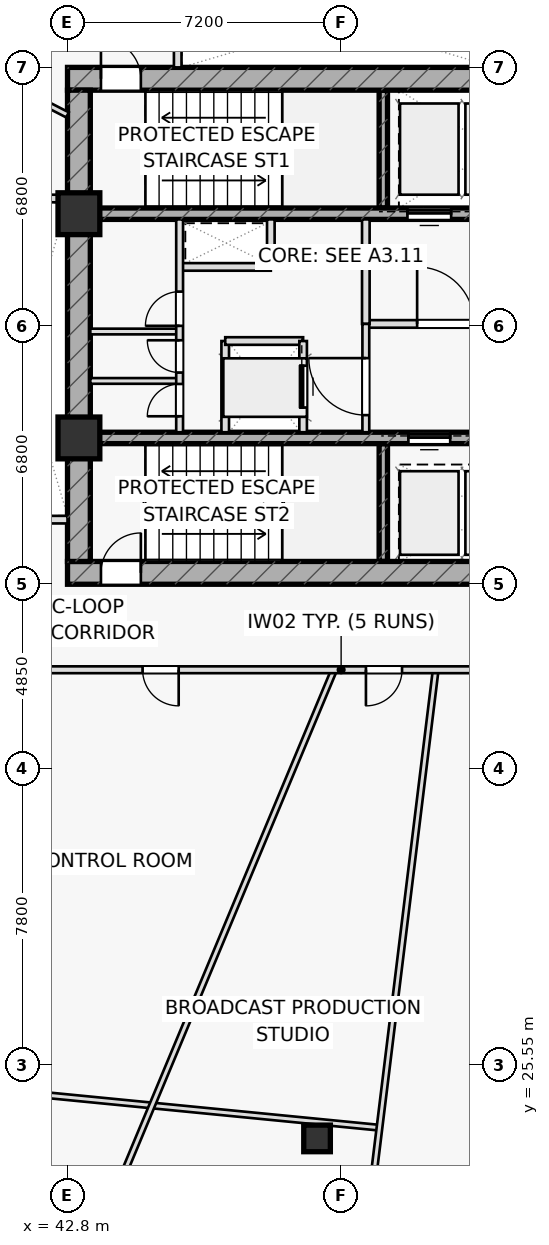
"""IFC4 building model, lengths in metres.
Left out: names, types, materials, properties, quantities, classifications, styles, units other than length and angle.
Written with IfcOpenShell. Run it as: python <this file> out.ifc"""

import sys

from ifc_helpers import new_model, si_unit, direction, frame, frame_2d, origin, origin_2d, place, context, subcontext, project, spatial, rectangle, hollow_rectangle, extrude, element, fill, save


model = new_model("IFC4")
c1 = context("Model", 3, precision=1e-05, world=origin(), true_north=direction((0.0, 1.0)))
c2 = subcontext(c1, "Body", "Model", "MODEL_VIEW")
j1 = project(units=[si_unit("LENGTHUNIT", "METRE"), si_unit("PLANEANGLEUNIT", "RADIAN")], contexts=[c1])
p1 = place(None, origin())
s1 = spatial("IfcSite", under=j1, at=p1, CompositionType="ELEMENT")
p2 = place(p1, origin())
s2 = spatial("IfcBuilding", under=s1, at=p2, CompositionType="ELEMENT")
p3 = place(p2, frame((0.0, 0.0, 115.6)))
s3 = spatial("IfcBuildingStorey", under=s2, at=p3, CompositionType="ELEMENT", Elevation=115.6)
for number, where, z_axis, x_axis in (
    (1, (51.11, 48.1, 0.0), (0.0, 0.0, 1.0), (0.0, 1.0, 0.0)),
    (2, (51.11, 38.8, 0.0), (0.0, 0.0, 1.0), (0.0, 1.0, 0.0)),
):
    element("IfcWall", number, at=place(p3, frame(where, z_axis=z_axis, x_axis=x_axis)), inside=s3, PredefinedType="SHEAR", context=c2, shape_type="SweptSolid", body=[
        extrude(rectangle(XDim=3.1, YDim=0.22, at=frame_2d((1.55, 0.0))), origin(), (0.0, 0.0, 1.0), 3.55),
    ])
p4 = place(p3, frame((42.8, 51.5, 0.0), z_axis=(0.0, 0.0, 1.0), x_axis=(1.0, 0.0, 0.0)))
e3 = element("IfcWall", 3, at=p4, inside=s3, PredefinedType="SHEAR", context=c2, shape_type="SweptSolid", body=[
    extrude(rectangle(XDim=14.4, YDim=0.6, at=frame_2d((7.2, 0.0))), origin(), (0.0, 0.0, 1.0), 3.55),
])
p5 = place(p4, frame((0.88, 0.0, 0.0)))
e4 = element("IfcOpeningElement", 4, at=p5, cuts=e3, PredefinedType="OPENING", context=c2, shape_type="SweptSolid", body=[
    extrude(rectangle(XDim=1.05, YDim=2.2, at=frame_2d((0.525, 1.1))), frame((0.0, 0.31, 0.0), z_axis=(0.0, -1.0, 0.0), x_axis=(1.0, 0.0, 0.0)), (0.0, 0.0, 1.0), 0.62),
])
p6 = place(p3, frame((42.8, 38.5, 0.0), z_axis=(0.0, 0.0, 1.0), x_axis=(1.0, 0.0, 0.0)))
e5 = element("IfcWall", 5, at=p6, inside=s3, PredefinedType="SHEAR", context=c2, shape_type="SweptSolid", body=[
    extrude(rectangle(XDim=14.4, YDim=0.6, at=frame_2d((7.2, 0.0))), origin(), (0.0, 0.0, 1.0), 3.55),
])
p7 = place(p6, frame((0.88, 0.0, 0.0)))
e6 = element("IfcOpeningElement", 6, at=p7, cuts=e5, PredefinedType="OPENING", context=c2, shape_type="SweptSolid", body=[
    extrude(rectangle(XDim=1.05, YDim=2.2, at=frame_2d((0.525, 1.1))), frame((0.0, 0.31, 0.0), z_axis=(0.0, -1.0, 0.0), x_axis=(1.0, 0.0, 0.0)), (0.0, 0.0, 1.0), 0.62),
])
p8 = place(p3, frame((43.1, 38.8, 0.0), z_axis=(0.0, 0.0, 1.0), x_axis=(0.0, 1.0, 0.0)))
e7 = element("IfcWall", 7, at=p8, inside=s3, PredefinedType="SHEAR", context=c2, shape_type="SweptSolid", body=[
    extrude(rectangle(XDim=12.4, YDim=0.6, at=frame_2d((6.2, 0.0))), origin(), (0.0, 0.0, 1.0), 3.55),
])
p9 = place(p3, frame((43.4, 47.95, 0.0), z_axis=(0.0, 0.0, 1.0), x_axis=(1.0, 0.0, 0.0)))
e8 = element("IfcWall", 8, at=p9, inside=s3, PredefinedType="SHEAR", context=c2, shape_type="SweptSolid", body=[
    extrude(rectangle(XDim=13.2, YDim=0.3, at=frame_2d((6.6, 0.0))), origin(), (0.0, 0.0, 1.0), 3.55),
])
p10 = place(p9, frame((8.345, 0.0, 0.0)))
e9 = element("IfcOpeningElement", 9, at=p10, cuts=e8, PredefinedType="OPENING", context=c2, shape_type="SweptSolid", body=[
    extrude(rectangle(XDim=1.15, YDim=2.2, at=frame_2d((0.575, 1.1))), frame((0.0, 0.16, 0.0), z_axis=(0.0, -1.0, 0.0), x_axis=(1.0, 0.0, 0.0)), (0.0, 0.0, 1.0), 0.32),
])
p11 = place(p9, frame((10.065, 0.0, 0.0)))
e10 = element("IfcOpeningElement", 10, at=p11, cuts=e8, PredefinedType="OPENING", context=c2, shape_type="SweptSolid", body=[
    extrude(rectangle(XDim=1.15, YDim=2.2, at=frame_2d((0.575, 1.1))), frame((0.0, 0.16, 0.0), z_axis=(0.0, -1.0, 0.0), x_axis=(1.0, 0.0, 0.0)), (0.0, 0.0, 1.0), 0.32),
])
p12 = place(p9, frame((11.645, 0.0, 0.0)))
e11 = element("IfcOpeningElement", 11, at=p12, cuts=e8, PredefinedType="OPENING", context=c2, shape_type="SweptSolid", body=[
    extrude(rectangle(XDim=1.15, YDim=2.2, at=frame_2d((0.575, 1.1))), frame((0.0, 0.16, 0.0), z_axis=(0.0, -1.0, 0.0), x_axis=(1.0, 0.0, 0.0)), (0.0, 0.0, 1.0), 0.32),
])
p13 = place(p3, frame((43.4, 42.05, 0.0), z_axis=(0.0, 0.0, 1.0), x_axis=(1.0, 0.0, 0.0)))
e12 = element("IfcWall", 12, at=p13, inside=s3, PredefinedType="SHEAR", context=c2, shape_type="SweptSolid", body=[
    extrude(rectangle(XDim=13.2, YDim=0.3, at=frame_2d((6.6, 0.0))), origin(), (0.0, 0.0, 1.0), 3.55),
])
p14 = place(p13, frame((8.37, 0.0, 0.0)))
e13 = element("IfcOpeningElement", 13, at=p14, cuts=e12, PredefinedType="OPENING", context=c2, shape_type="SweptSolid", body=[
    extrude(rectangle(XDim=1.1, YDim=2.15, at=frame_2d((0.55, 1.075))), frame((0.0, 0.16, 0.0), z_axis=(0.0, -1.0, 0.0), x_axis=(1.0, 0.0, 0.0)), (0.0, 0.0, 1.0), 0.32),
])
p15 = place(p13, frame((10.09, 0.0, 0.0)))
e14 = element("IfcOpeningElement", 14, at=p15, cuts=e12, PredefinedType="OPENING", context=c2, shape_type="SweptSolid", body=[
    extrude(rectangle(XDim=1.1, YDim=2.15, at=frame_2d((0.55, 1.075))), frame((0.0, 0.16, 0.0), z_axis=(0.0, -1.0, 0.0), x_axis=(1.0, 0.0, 0.0)), (0.0, 0.0, 1.0), 0.32),
])
p16 = place(p13, frame((11.83, 0.0, 0.0)))
e15 = element("IfcOpeningElement", 15, at=p16, cuts=e12, PredefinedType="OPENING", context=c2, shape_type="SweptSolid", body=[
    extrude(rectangle(XDim=1.1, YDim=2.15, at=frame_2d((0.55, 1.075))), frame((0.0, 0.16, 0.0), z_axis=(0.0, -1.0, 0.0), x_axis=(1.0, 0.0, 0.0)), (0.0, 0.0, 1.0), 0.32),
])
for number, where, z_axis, x_axis in (
    (16, (43.1, 47.95, 0.0), (0.0, 0.0, 1.0), (1.0, 0.0, 0.0)),
    (17, (43.1, 42.05, 0.0), (0.0, 0.0, 1.0), (1.0, 0.0, 0.0)),
):
    element("IfcColumn", number, at=place(p3, frame(where, z_axis=z_axis, x_axis=x_axis)), inside=s3, PredefinedType="COLUMN", context=c2, shape_type="SweptSolid", body=[
        extrude(rectangle(XDim=1.1, YDim=1.1, at=origin_2d()), origin(), (0.0, 0.0, 1.0), 3.55),
    ])
p17 = place(p3, frame((49.366, 23.619, 0.0), z_axis=(0.0, 0.0, 1.0), x_axis=(1.0, 0.0, 0.0)))
e18 = element("IfcColumn", 18, at=p17, inside=s3, PredefinedType="COLUMN", context=c2, shape_type="SweptSolid", body=[
    extrude(hollow_rectangle(XDim=0.7, YDim=0.7, WallThickness=0.04, at=origin_2d()), origin(), (0.0, 0.0, 1.0), 3.55),
])
for number, where, z_axis, x_axis in (
    (19, (40.3, 39.9, 0.0), (0.0, 0.0, 1.0), (1.0, 0.0, 0.0)),
    (20, (40.3, 48.35, 0.0), (0.0, 0.0, 1.0), (1.0, 0.0, 0.0)),
    (21, (45.7, 51.8, 0.0), (0.0, 0.0, 1.0), (0.0, 1.0, 0.0)),
):
    element("IfcWall", number, at=place(p3, frame(where, z_axis=z_axis, x_axis=x_axis)), inside=s3, PredefinedType="PARTITIONING", context=c2, shape_type="SweptSolid", body=[
        extrude(rectangle(XDim=2.5, YDim=0.2, at=frame_2d((1.25, 0.0))), origin(), (0.0, 0.0, 1.0), 3.55),
    ])
p18 = place(p3, frame((45.75, 46.55, 0.0), z_axis=(0.0, 0.0, 1.0), x_axis=(1.0, 0.0, 0.0)))
e22 = element("IfcWall", 22, at=p18, inside=s3, PredefinedType="PARTITIONING", context=c2, shape_type="SweptSolid", body=[
    extrude(rectangle(XDim=2.4, YDim=0.2, at=frame_2d((1.2, 0.0))), origin(), (0.0, 0.0, 1.0), 3.55),
])
p19 = place(p3, frame((48.15, 46.55, 0.0), z_axis=(0.0, 0.0, 1.0), x_axis=(0.0, 1.0, 0.0)))
e23 = element("IfcWall", 23, at=p19, inside=s3, PredefinedType="PARTITIONING", context=c2, shape_type="SweptSolid", body=[
    extrude(rectangle(XDim=1.25, YDim=0.2, at=frame_2d((0.625, 0.0))), origin(), (0.0, 0.0, 1.0), 3.55),
])
p20 = place(p3, frame((46.95, 42.2, 0.0), z_axis=(0.0, 0.0, 1.0), x_axis=(0.0, 1.0, 0.0)))
e24 = element("IfcWall", 24, at=p20, inside=s3, PredefinedType="PARTITIONING", context=c2, shape_type="SweptSolid", body=[
    extrude(rectangle(XDim=2.4, YDim=0.2, at=frame_2d((1.2, 0.0))), origin(), (0.0, 0.0, 1.0), 3.55),
])
p21 = place(p3, frame((46.95, 44.6, 0.0), z_axis=(0.0, 0.0, 1.0), x_axis=(1.0, 0.0, 0.0)))
e25 = element("IfcWall", 25, at=p21, inside=s3, PredefinedType="PARTITIONING", context=c2, shape_type="SweptSolid", body=[
    extrude(rectangle(XDim=2.05, YDim=0.2, at=frame_2d((1.025, 0.0))), origin(), (0.0, 0.0, 1.0), 3.55),
])
p22 = place(p3, frame((50.65, 45.05, 0.0), z_axis=(0.0, 0.0, 1.0), x_axis=(1.0, 0.0, 0.0)))
e26 = element("IfcWall", 26, at=p22, inside=s3, PredefinedType="PARTITIONING", context=c2, shape_type="SweptSolid", body=[
    extrude(rectangle(XDim=5.95, YDim=0.2, at=frame_2d((2.975, 0.0))), origin(), (0.0, 0.0, 1.0), 3.55),
])
p23 = place(p22, frame((1.35, 0.0, 0.0)))
e27 = element("IfcOpeningElement", 27, at=p23, cuts=e26, PredefinedType="OPENING", context=c2, shape_type="SweptSolid", body=[
    extrude(rectangle(XDim=1.5, YDim=2.2, at=frame_2d((0.75, 1.1))), frame((0.0, 0.11, 0.0), z_axis=(0.0, -1.0, 0.0), x_axis=(1.0, 0.0, 0.0)), (0.0, 0.0, 1.0), 0.22),
])
p24 = place(p3, frame((50.65, 45.05, 0.0), z_axis=(0.0, 0.0, 1.0), x_axis=(0.0, 1.0, 0.0)))
e28 = element("IfcWall", 28, at=p24, inside=s3, PredefinedType="PARTITIONING", context=c2, shape_type="SweptSolid", body=[
    extrude(rectangle(XDim=2.75, YDim=0.2, at=frame_2d((1.375, 0.0))), origin(), (0.0, 0.0, 1.0), 3.55),
])
p25 = place(p3, frame((50.65, 42.2, 0.0), z_axis=(0.0, 0.0, 1.0), x_axis=(0.0, 1.0, 0.0)))
e29 = element("IfcWall", 29, at=p25, inside=s3, PredefinedType="PARTITIONING", context=c2, shape_type="SweptSolid", body=[
    extrude(rectangle(XDim=2.85, YDim=0.18, at=frame_2d((1.425, 0.0))), origin(), (0.0, 0.0, 1.0), 3.55),
])
p26 = place(p25, frame((0.45, 0.0, 0.0)))
e30 = element("IfcOpeningElement", 30, at=p26, cuts=e29, PredefinedType="OPENING", context=c2, shape_type="SweptSolid", body=[
    extrude(rectangle(XDim=1.5, YDim=2.2, at=frame_2d((0.75, 1.1))), frame((0.0, 0.1, 0.0), z_axis=(0.0, -1.0, 0.0), x_axis=(1.0, 0.0, 0.0)), (0.0, 0.0, 1.0), 0.2),
])
for number, where, z_axis, x_axis in (
    (31, (43.4, 43.55, 0.0), (0.0, 0.0, 1.0), (1.0, 0.0, 0.0)),
    (32, (43.4, 44.85, 0.0), (0.0, 0.0, 1.0), (1.0, 0.0, 0.0)),
):
    element("IfcWall", number, at=place(p3, frame(where, z_axis=z_axis, x_axis=x_axis)), inside=s3, PredefinedType="PARTITIONING", context=c2, shape_type="SweptSolid", body=[
        extrude(rectangle(XDim=2.35, YDim=0.15, at=frame_2d((1.175, 0.0))), origin(), (0.0, 0.0, 1.0), 3.55),
    ])
p27 = place(p3, frame((45.75, 42.2, 0.0), z_axis=(0.0, 0.0, 1.0), x_axis=(0.0, 1.0, 0.0)))
e33 = element("IfcWall", 33, at=p27, inside=s3, PredefinedType="PARTITIONING", context=c2, shape_type="SweptSolid", body=[
    extrude(rectangle(XDim=5.6, YDim=0.18, at=frame_2d((2.8, 0.0))), origin(), (0.0, 0.0, 1.0), 3.55),
])
p28 = place(p27, frame((0.42, 0.0, 0.0)))
e34 = element("IfcOpeningElement", 34, at=p28, cuts=e33, PredefinedType="OPENING", context=c2, shape_type="SweptSolid", body=[
    extrude(rectangle(XDim=0.85, YDim=2.05, at=frame_2d((0.425, 1.025))), frame((0.0, 0.1, 0.0), z_axis=(0.0, -1.0, 0.0), x_axis=(1.0, 0.0, 0.0)), (0.0, 0.0, 1.0), 0.2),
])
p29 = place(p27, frame((1.57, 0.0, 0.0)))
e35 = element("IfcOpeningElement", 35, at=p29, cuts=e33, PredefinedType="OPENING", context=c2, shape_type="SweptSolid", body=[
    extrude(rectangle(XDim=0.85, YDim=2.05, at=frame_2d((0.425, 1.025))), frame((0.0, 0.1, 0.0), z_axis=(0.0, -1.0, 0.0), x_axis=(1.0, 0.0, 0.0)), (0.0, 0.0, 1.0), 0.2),
])
p30 = place(p27, frame((2.8, 0.0, 0.0)))
e36 = element("IfcOpeningElement", 36, at=p30, cuts=e33, PredefinedType="OPENING", context=c2, shape_type="SweptSolid", body=[
    extrude(rectangle(XDim=0.9, YDim=2.05, at=frame_2d((0.45, 1.025))), frame((0.0, 0.1, 0.0), z_axis=(0.0, -1.0, 0.0), x_axis=(1.0, 0.0, 0.0)), (0.0, 0.0, 1.0), 0.2),
])
p31 = place(p3, frame((39.589, 25.018, 0.0), z_axis=(0.0, 0.0, 1.0), x_axis=(0.99524905582, -0.097361783517, 0.0)))
e37 = element("IfcWall", 37, at=p31, inside=s3, PredefinedType="PARTITIONING", context=c2, shape_type="SweptSolid", body=[
    extrude(rectangle(XDim=11.467, YDim=0.15, at=frame_2d((5.733, 0.0))), origin(), (0.0, 0.0, 1.0), 2.835),
])
p32 = place(p3, frame((52.489, 35.95, 0.0), z_axis=(0.0, 0.0, 1.0), x_axis=(-0.121867943368, -0.992546323543, 0.0)))
e38 = element("IfcWall", 38, at=p32, inside=s3, PredefinedType="PARTITIONING", context=c2, shape_type="SweptSolid", body=[
    extrude(rectangle(XDim=14.632, YDim=0.15, at=frame_2d((7.316, 0.0))), origin(), (0.0, 0.0, 1.0), 2.975),
])
p33 = place(p3, frame((42.8, 50.55, 0.0), z_axis=(0.0, 0.0, 1.0), x_axis=(-0.889423329843, 0.457084390819, 0.0)))
e39 = element("IfcWall", 39, at=p33, inside=s3, PredefinedType="PARTITIONING", context=c2, shape_type="SweptSolid", body=[
    extrude(rectangle(XDim=12.786, YDim=0.15, at=frame_2d((6.393, 0.0))), origin(), (0.0, 0.0, 1.0), 2.835),
])
p34 = place(p3, frame((49.817, 35.95, 0.0), z_axis=(0.0, 0.0, 1.0), x_axis=(-0.385665325274, -0.922638746683, 0.0)))
e40 = element("IfcWall", 40, at=p34, inside=s3, PredefinedType="PARTITIONING", context=c2, shape_type="SweptSolid", body=[
    extrude(rectangle(XDim=16.771, YDim=0.15, at=frame_2d((8.385, 0.0))), origin(), (0.0, 0.0, 1.0), 2.835),
])
p35 = place(p3, frame((59.5, 35.95, 0.0), z_axis=(0.0, 0.0, 1.0), x_axis=(-1.0, 0.0, 0.0)))
e41 = element("IfcWall", 41, at=p35, inside=s3, PredefinedType="PARTITIONING", context=c2, shape_type="SweptSolid", body=[
    extrude(rectangle(XDim=19.0, YDim=0.18, at=frame_2d((9.5, 0.0))), origin(), (0.0, 0.0, 1.0), 2.835),
])
p36 = place(p35, frame((3.155, 0.0, 0.0)))
e42 = element("IfcOpeningElement", 42, at=p36, cuts=e41, PredefinedType="OPENING", context=c2, shape_type="SweptSolid", body=[
    extrude(rectangle(XDim=0.95, YDim=2.05, at=frame_2d((0.475, 1.025))), frame((0.0, 0.1, 0.0), z_axis=(0.0, -1.0, 0.0), x_axis=(1.0, 0.0, 0.0)), (0.0, 0.0, 1.0), 0.2),
])
p37 = place(p35, frame((7.897, 0.0, 0.0)))
e43 = element("IfcOpeningElement", 43, at=p37, cuts=e41, PredefinedType="OPENING", context=c2, shape_type="SweptSolid", body=[
    extrude(rectangle(XDim=0.95, YDim=2.05, at=frame_2d((0.475, 1.025))), frame((0.0, 0.1, 0.0), z_axis=(0.0, -1.0, 0.0), x_axis=(1.0, 0.0, 0.0)), (0.0, 0.0, 1.0), 0.2),
])
p38 = place(p35, frame((13.774, 0.0, 0.0)))
e44 = element("IfcOpeningElement", 44, at=p38, cuts=e41, PredefinedType="OPENING", context=c2, shape_type="SweptSolid", body=[
    extrude(rectangle(XDim=0.95, YDim=2.05, at=frame_2d((0.475, 1.025))), frame((0.0, 0.1, 0.0), z_axis=(0.0, -1.0, 0.0), x_axis=(1.0, 0.0, 0.0)), (0.0, 0.0, 1.0), 0.2),
])
p39 = place(p3, frame((49.0, 42.2, 0.0), z_axis=(0.0, 0.0, 1.0), x_axis=(0.0, 1.0, 0.0)))
e45 = element("IfcWall", 45, at=p39, inside=s3, PredefinedType="PARTITIONING", context=c2, shape_type="SweptSolid", body=[
    extrude(rectangle(XDim=2.4, YDim=0.2, at=frame_2d((1.2, 0.0))), origin(), (0.0, 0.0, 1.0), 3.55),
])
p40 = place(p39, frame((0.65, 0.0, 0.0)))
e46 = element("IfcOpeningElement", 46, at=p40, cuts=e45, PredefinedType="OPENING", context=c2, shape_type="SweptSolid", body=[
    extrude(rectangle(XDim=1.1, YDim=2.15, at=frame_2d((0.55, 1.075))), frame((0.0, 0.11, 0.0), z_axis=(0.0, -1.0, 0.0), x_axis=(1.0, 0.0, 0.0)), (0.0, 0.0, 1.0), 0.22),
])
p41 = place(p5, origin())
e47 = element("IfcDoor", 47, at=p41, inside=s3, OperationType="SINGLE_SWING_LEFT", PredefinedType="DOOR", context=c2, shape_type="SweptSolid", body=[
    extrude(rectangle(XDim=1.05, YDim=2.2, at=frame_2d((0.525, 1.1))), frame((0.0, 0.025, 0.0), z_axis=(0.0, -1.0, 0.0), x_axis=(1.0, 0.0, 0.0)), (0.0, 0.0, 1.0), 0.05),
])
fill(e4, e47)
p42 = place(p7, origin())
e48 = element("IfcDoor", 48, at=p42, inside=s3, OperationType="SINGLE_SWING_RIGHT", PredefinedType="DOOR", context=c2, shape_type="SweptSolid", body=[
    extrude(rectangle(XDim=1.05, YDim=2.2, at=frame_2d((0.525, 1.1))), frame((0.0, 0.025, 0.0), z_axis=(0.0, -1.0, 0.0), x_axis=(1.0, 0.0, 0.0)), (0.0, 0.0, 1.0), 0.05),
])
fill(e6, e48)
p43 = place(p23, origin())
e49 = element("IfcDoor", 49, at=p43, inside=s3, OperationType="SINGLE_SWING_LEFT", PredefinedType="DOOR", context=c2, shape_type="SweptSolid", body=[
    extrude(rectangle(XDim=1.5, YDim=2.2, at=frame_2d((0.75, 1.1))), frame((0.0, 0.025, 0.0), z_axis=(0.0, -1.0, 0.0), x_axis=(1.0, 0.0, 0.0)), (0.0, 0.0, 1.0), 0.05),
])
fill(e27, e49)
p44 = place(p26, origin())
e50 = element("IfcDoor", 50, at=p44, inside=s3, OperationType="SINGLE_SWING_RIGHT", PredefinedType="DOOR", context=c2, shape_type="SweptSolid", body=[
    extrude(rectangle(XDim=1.5, YDim=2.2, at=frame_2d((0.75, 1.1))), frame((0.0, 0.025, 0.0), z_axis=(0.0, -1.0, 0.0), x_axis=(1.0, 0.0, 0.0)), (0.0, 0.0, 1.0), 0.05),
])
fill(e30, e50)
p45 = place(p28, origin())
e51 = element("IfcDoor", 51, at=p45, inside=s3, OperationType="SINGLE_SWING_LEFT", PredefinedType="DOOR", context=c2, shape_type="SweptSolid", body=[
    extrude(rectangle(XDim=0.85, YDim=2.05, at=frame_2d((0.425, 1.025))), frame((0.0, 0.025, 0.0), z_axis=(0.0, -1.0, 0.0), x_axis=(1.0, 0.0, 0.0)), (0.0, 0.0, 1.0), 0.05),
])
fill(e34, e51)
p46 = place(p29, origin())
e52 = element("IfcDoor", 52, at=p46, inside=s3, OperationType="SINGLE_SWING_RIGHT", PredefinedType="DOOR", context=c2, shape_type="SweptSolid", body=[
    extrude(rectangle(XDim=0.85, YDim=2.05, at=frame_2d((0.425, 1.025))), frame((0.0, 0.025, 0.0), z_axis=(0.0, -1.0, 0.0), x_axis=(1.0, 0.0, 0.0)), (0.0, 0.0, 1.0), 0.05),
])
fill(e35, e52)
p47 = place(p30, origin())
e53 = element("IfcDoor", 53, at=p47, inside=s3, OperationType="SINGLE_SWING_LEFT", PredefinedType="DOOR", context=c2, shape_type="SweptSolid", body=[
    extrude(rectangle(XDim=0.9, YDim=2.05, at=frame_2d((0.45, 1.025))), frame((0.0, 0.025, 0.0), z_axis=(0.0, -1.0, 0.0), x_axis=(1.0, 0.0, 0.0)), (0.0, 0.0, 1.0), 0.05),
])
fill(e36, e53)
p48 = place(p37, origin())
e54 = element("IfcDoor", 54, at=p48, inside=s3, OperationType="SINGLE_SWING_RIGHT", PredefinedType="DOOR", context=c2, shape_type="SweptSolid", body=[
    extrude(rectangle(XDim=0.95, YDim=2.05, at=frame_2d((0.475, 1.025))), frame((0.0, 0.025, 0.0), z_axis=(0.0, -1.0, 0.0), x_axis=(1.0, 0.0, 0.0)), (0.0, 0.0, 1.0), 0.05),
])
fill(e43, e54)
p49 = place(p38, origin())
e55 = element("IfcDoor", 55, at=p49, inside=s3, OperationType="SINGLE_SWING_LEFT", PredefinedType="DOOR", context=c2, shape_type="SweptSolid", body=[
    extrude(rectangle(XDim=0.95, YDim=2.05, at=frame_2d((0.475, 1.025))), frame((0.0, 0.025, 0.0), z_axis=(0.0, -1.0, 0.0), x_axis=(1.0, 0.0, 0.0)), (0.0, 0.0, 1.0), 0.05),
])
fill(e44, e55)
p50 = place(p10, origin())
e56 = element("IfcDoor", 56, at=p50, inside=s3, OperationType="SLIDING_TO_LEFT", PredefinedType="DOOR", context=c2, shape_type="SweptSolid", body=[
    extrude(rectangle(XDim=1.15, YDim=2.2, at=frame_2d((0.575, 1.1))), frame((0.0, 0.025, 0.0), z_axis=(0.0, -1.0, 0.0), x_axis=(1.0, 0.0, 0.0)), (0.0, 0.0, 1.0), 0.05),
])
fill(e9, e56)
p51 = place(p14, origin())
e57 = element("IfcDoor", 57, at=p51, inside=s3, OperationType="SLIDING_TO_LEFT", PredefinedType="DOOR", context=c2, shape_type="SweptSolid", body=[
    extrude(rectangle(XDim=1.1, YDim=2.15, at=frame_2d((0.55, 1.075))), frame((0.0, 0.025, 0.0), z_axis=(0.0, -1.0, 0.0), x_axis=(1.0, 0.0, 0.0)), (0.0, 0.0, 1.0), 0.05),
])
fill(e13, e57)
p52 = place(p40, origin())
e58 = element("IfcDoor", 58, at=p52, inside=s3, OperationType="SLIDING_TO_RIGHT", PredefinedType="DOOR", context=c2, shape_type="SweptSolid", body=[
    extrude(rectangle(XDim=1.1, YDim=2.15, at=frame_2d((0.55, 1.075))), frame((0.0, 0.025, 0.0), z_axis=(0.0, -1.0, 0.0), x_axis=(1.0, 0.0, 0.0)), (0.0, 0.0, 1.0), 0.05),
])
fill(e46, e58)
save(model, sys.argv[1])
